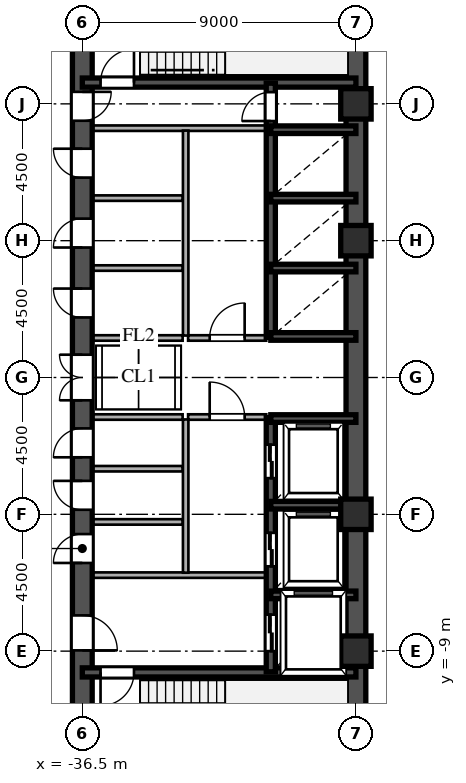
"""IFC4 building model, lengths in metres.
Left out: names, types, materials, properties, quantities, classifications, styles, units other than length and angle.
Written with IfcOpenShell. Run it as: python <this file> out.ifc"""

import sys

from ifc_helpers import new_model, si_unit, direction, frame, frame_2d, origin, origin_2d, place, context, subcontext, project, spatial, rectangle, hollow_rectangle, extrude, source, transform, mapped, element, fill, save


model = new_model("IFC4")
c1 = context("Model", 3, precision=1e-05, world=origin(), true_north=direction((0.0, 1.0)))
c2 = subcontext(c1, "Body", "Model", "MODEL_VIEW")
j1 = project(units=[si_unit("LENGTHUNIT", "METRE"), si_unit("PLANEANGLEUNIT", "RADIAN")], contexts=[c1])
p1 = place(None, origin())
s1 = spatial("IfcSite", under=j1, at=p1, CompositionType="ELEMENT")
p2 = place(p1, origin())
s2 = spatial("IfcBuilding", under=s1, at=p2, CompositionType="ELEMENT")
p3 = place(p2, frame((0.0, 0.0, 80.1)))
s3 = spatial("IfcBuildingStorey", under=s2, at=p3, CompositionType="ELEMENT", Elevation=80.1)
m1 = source(origin(), c2, "Body", "SweptSolid", [
    extrude(hollow_rectangle(XDim=1.0, YDim=1.0, WallThickness=0.042, at=origin_2d()), origin(), (0.0, 0.0, 1.0), 3.6),
])
for number, where, z_axis, x_axis in (
    (1, (-27.5, -9.0, 0.0), (0.0, 0.0, 1.0), (1.0, 0.0, 0.0)),
    (2, (-27.5, -4.5, 0.0), (0.0, 0.0, 1.0), (1.0, 0.0, 0.0)),
    (3, (-27.5, 4.5, 0.0), (0.0, 0.0, 1.0), (1.0, 0.0, 0.0)),
    (4, (-27.5, 9.0, 0.0), (0.0, 0.0, 1.0), (1.0, 0.0, 0.0)),
):
    element("IfcColumn", number, at=place(p3, frame(where, z_axis=z_axis, x_axis=x_axis)), inside=s3, PredefinedType="COLUMN", context=c2, shape_type="MappedRepresentation", body=[
        mapped(m1, transform((0.0, 0.0, 0.0), scale=1.0)),
    ])
for number, where, z_axis, x_axis in (
    (5, (-27.5, -13.5, 0.0), (0.0, 0.0, 1.0), (0.0, 1.0, 0.0)),
    (6, (-27.5, 1.3, 0.0), (0.0, 0.0, 1.0), (0.0, 1.0, 0.0)),
):
    element("IfcWall", number, at=place(p3, frame(where, z_axis=z_axis, x_axis=x_axis)), inside=s3, PredefinedType="SHEAR", context=c2, shape_type="SweptSolid", body=[
        extrude(rectangle(XDim=12.2, YDim=0.65, at=frame_2d((6.1, 0.0))), origin(), (0.0, 0.0, 1.0), 3.38),
    ])
p4 = place(p3, frame((-27.5, -1.3, 0.0), z_axis=(0.0, 0.0, 1.0), x_axis=(0.0, 1.0, 0.0)))
e7 = element("IfcWall", 7, at=p4, inside=s3, PredefinedType="SHEAR", context=c2, shape_type="SweptSolid", body=[
    extrude(rectangle(XDim=2.6, YDim=0.65, at=frame_2d((1.3, 0.0))), origin(), (0.0, 0.0, 1.0), 3.38),
])
p5 = place(p3, frame((-36.5, -13.65, 0.0), z_axis=(0.0, 0.0, 1.0), x_axis=(0.0, 1.0, 0.0)))
e8 = element("IfcWall", 8, at=p5, inside=s3, PredefinedType="SHEAR", context=c2, shape_type="SweptSolid", body=[
    extrude(rectangle(XDim=7.15, YDim=0.65, at=frame_2d((3.575, 0.0))), origin(), (0.0, 0.0, 1.0), 3.38),
])
p6 = place(p5, frame((4.675, 0.0, 0.0)))
e9 = element("IfcOpeningElement", 9, at=p6, cuts=e8, PredefinedType="OPENING", context=c2, shape_type="SweptSolid", body=[
    extrude(rectangle(XDim=1.15, YDim=2.2, at=frame_2d((0.575, 1.1))), frame((0.0, 0.335, 0.0), z_axis=(0.0, -1.0, 0.0), x_axis=(1.0, 0.0, 0.0)), (0.0, 0.0, 1.0), 0.67),
])
p7 = place(p3, frame((-36.5, -1.3, 0.0), z_axis=(0.0, 0.0, 1.0), x_axis=(0.0, 1.0, 0.0)))
e10 = element("IfcWall", 10, at=p7, inside=s3, PredefinedType="SHEAR", context=c2, shape_type="SweptSolid", body=[
    extrude(rectangle(XDim=2.6, YDim=0.65, at=frame_2d((1.3, 0.0))), origin(), (0.0, 0.0, 1.0), 3.38),
])
p8 = place(p7, frame((0.55, 0.0, 0.0)))
e11 = element("IfcOpeningElement", 11, at=p8, cuts=e10, PredefinedType="OPENING", context=c2, shape_type="SweptSolid", body=[
    extrude(rectangle(XDim=1.5, YDim=2.3, at=frame_2d((0.75, 1.15))), frame((0.0, 0.335, 0.0), z_axis=(0.0, -1.0, 0.0), x_axis=(1.0, 0.0, 0.0)), (0.0, 0.0, 1.0), 0.67),
])
p9 = place(p3, frame((-36.5, 8.2, 0.0), z_axis=(0.0, 0.0, 1.0), x_axis=(0.0, 1.0, 0.0)))
e12 = element("IfcWall", 12, at=p9, inside=s3, PredefinedType="SHEAR", context=c2, shape_type="SweptSolid", body=[
    extrude(rectangle(XDim=5.45, YDim=0.65, at=frame_2d((2.725, 0.0))), origin(), (0.0, 0.0, 1.0), 3.38),
])
p10 = place(p9, frame((0.245, 0.0, 0.0)))
e13 = element("IfcOpeningElement", 13, at=p10, cuts=e12, PredefinedType="OPENING", context=c2, shape_type="SweptSolid", body=[
    extrude(rectangle(XDim=0.95, YDim=2.15, at=frame_2d((0.475, 1.075))), frame((0.0, 0.335, 0.0), z_axis=(0.0, -1.0, 0.0), x_axis=(1.0, 0.0, 0.0)), (0.0, 0.0, 1.0), 0.67),
])
p11 = place(p3, frame((-36.5, -6.5, 0.0), z_axis=(0.0, 0.0, 1.0), x_axis=(0.0, 1.0, 0.0)))
e14 = element("IfcWall", 14, at=p11, inside=s3, PredefinedType="SHEAR", context=c2, shape_type="SweptSolid", body=[
    extrude(rectangle(XDim=1.75, YDim=0.65, at=frame_2d((0.875, 0.0))), origin(), (0.0, 0.0, 1.0), 3.38),
])
p12 = place(p11, frame((0.4, 0.0, 0.0)))
e15 = element("IfcOpeningElement", 15, at=p12, cuts=e14, PredefinedType="OPENING", context=c2, shape_type="SweptSolid", body=[
    extrude(rectangle(XDim=0.95, YDim=2.15, at=frame_2d((0.475, 1.075))), frame((0.0, 0.335, 0.0), z_axis=(0.0, -1.0, 0.0), x_axis=(1.0, 0.0, 0.0)), (0.0, 0.0, 1.0), 0.67),
])
p13 = place(p3, frame((-36.5, -4.75, 0.0), z_axis=(0.0, 0.0, 1.0), x_axis=(0.0, 1.0, 0.0)))
e16 = element("IfcWall", 16, at=p13, inside=s3, PredefinedType="SHEAR", context=c2, shape_type="SweptSolid", body=[
    extrude(rectangle(XDim=1.75, YDim=0.65, at=frame_2d((0.875, 0.0))), origin(), (0.0, 0.0, 1.0), 3.38),
])
p14 = place(p13, frame((0.4, 0.0, 0.0)))
e17 = element("IfcOpeningElement", 17, at=p14, cuts=e16, PredefinedType="OPENING", context=c2, shape_type="SweptSolid", body=[
    extrude(rectangle(XDim=0.95, YDim=2.15, at=frame_2d((0.475, 1.075))), frame((0.0, 0.335, 0.0), z_axis=(0.0, -1.0, 0.0), x_axis=(1.0, 0.0, 0.0)), (0.0, 0.0, 1.0), 0.67),
])
p15 = place(p3, frame((-36.5, -3.0, 0.0), z_axis=(0.0, 0.0, 1.0), x_axis=(0.0, 1.0, 0.0)))
e18 = element("IfcWall", 18, at=p15, inside=s3, PredefinedType="SHEAR", context=c2, shape_type="SweptSolid", body=[
    extrude(rectangle(XDim=1.7, YDim=0.65, at=frame_2d((0.85, 0.0))), origin(), (0.0, 0.0, 1.0), 3.38),
])
p16 = place(p15, frame((0.375, 0.0, 0.0)))
e19 = element("IfcOpeningElement", 19, at=p16, cuts=e18, PredefinedType="OPENING", context=c2, shape_type="SweptSolid", body=[
    extrude(rectangle(XDim=0.95, YDim=2.15, at=frame_2d((0.475, 1.075))), frame((0.0, 0.335, 0.0), z_axis=(0.0, -1.0, 0.0), x_axis=(1.0, 0.0, 0.0)), (0.0, 0.0, 1.0), 0.67),
])
p17 = place(p3, frame((-36.5, 1.3, 0.0), z_axis=(0.0, 0.0, 1.0), x_axis=(0.0, 1.0, 0.0)))
e20 = element("IfcWall", 20, at=p17, inside=s3, PredefinedType="SHEAR", context=c2, shape_type="SweptSolid", body=[
    extrude(rectangle(XDim=2.3, YDim=0.65, at=frame_2d((1.15, 0.0))), origin(), (0.0, 0.0, 1.0), 3.38),
])
p18 = place(p17, frame((0.675, 0.0, 0.0)))
e21 = element("IfcOpeningElement", 21, at=p18, cuts=e20, PredefinedType="OPENING", context=c2, shape_type="SweptSolid", body=[
    extrude(rectangle(XDim=0.95, YDim=2.15, at=frame_2d((0.475, 1.075))), frame((0.0, 0.335, 0.0), z_axis=(0.0, -1.0, 0.0), x_axis=(1.0, 0.0, 0.0)), (0.0, 0.0, 1.0), 0.67),
])
p19 = place(p3, frame((-36.5, 3.6, 0.0), z_axis=(0.0, 0.0, 1.0), x_axis=(0.0, 1.0, 0.0)))
e22 = element("IfcWall", 22, at=p19, inside=s3, PredefinedType="SHEAR", context=c2, shape_type="SweptSolid", body=[
    extrude(rectangle(XDim=2.3, YDim=0.65, at=frame_2d((1.15, 0.0))), origin(), (0.0, 0.0, 1.0), 3.38),
])
p20 = place(p19, frame((0.675, 0.0, 0.0)))
e23 = element("IfcOpeningElement", 23, at=p20, cuts=e22, PredefinedType="OPENING", context=c2, shape_type="SweptSolid", body=[
    extrude(rectangle(XDim=0.95, YDim=2.15, at=frame_2d((0.475, 1.075))), frame((0.0, 0.335, 0.0), z_axis=(0.0, -1.0, 0.0), x_axis=(1.0, 0.0, 0.0)), (0.0, 0.0, 1.0), 0.67),
])
p21 = place(p3, frame((-36.5, 5.9, 0.0), z_axis=(0.0, 0.0, 1.0), x_axis=(0.0, 1.0, 0.0)))
e24 = element("IfcWall", 24, at=p21, inside=s3, PredefinedType="SHEAR", context=c2, shape_type="SweptSolid", body=[
    extrude(rectangle(XDim=2.3, YDim=0.65, at=frame_2d((1.15, 0.0))), origin(), (0.0, 0.0, 1.0), 3.38),
])
p22 = place(p21, frame((0.675, 0.0, 0.0)))
e25 = element("IfcOpeningElement", 25, at=p22, cuts=e24, PredefinedType="OPENING", context=c2, shape_type="SweptSolid", body=[
    extrude(rectangle(XDim=0.95, YDim=2.15, at=frame_2d((0.475, 1.075))), frame((0.0, 0.335, 0.0), z_axis=(0.0, -1.0, 0.0), x_axis=(1.0, 0.0, 0.0)), (0.0, 0.0, 1.0), 0.67),
])
p23 = place(p3, frame((-36.5, -9.7, 0.0), z_axis=(0.0, 0.0, 1.0), x_axis=(1.0, 0.0, 0.0)))
e26 = element("IfcWall", 26, at=p23, inside=s3, PredefinedType="SHEAR", context=c2, shape_type="SweptSolid", body=[
    extrude(rectangle(XDim=9.0, YDim=0.3, at=frame_2d((4.5, 0.0))), origin(), (0.0, 0.0, 1.0), 3.38),
])
p24 = place(p23, frame((0.6, 0.0, 0.0)))
e27 = element("IfcOpeningElement", 27, at=p24, cuts=e26, PredefinedType="OPENING", context=c2, shape_type="SweptSolid", body=[
    extrude(rectangle(XDim=1.1, YDim=2.2, at=frame_2d((0.55, 1.1))), frame((0.0, 0.16, 0.0), z_axis=(0.0, -1.0, 0.0), x_axis=(1.0, 0.0, 0.0)), (0.0, 0.0, 1.0), 0.32),
])
p25 = place(p3, frame((-36.5, 9.7, 0.0), z_axis=(0.0, 0.0, 1.0), x_axis=(1.0, 0.0, 0.0)))
e28 = element("IfcWall", 28, at=p25, inside=s3, PredefinedType="SHEAR", context=c2, shape_type="SweptSolid", body=[
    extrude(rectangle(XDim=9.0, YDim=0.3, at=frame_2d((4.5, 0.0))), origin(), (0.0, 0.0, 1.0), 3.38),
])
p26 = place(p25, frame((0.6, 0.0, 0.0)))
e29 = element("IfcOpeningElement", 29, at=p26, cuts=e28, PredefinedType="OPENING", context=c2, shape_type="SweptSolid", body=[
    extrude(rectangle(XDim=1.1, YDim=2.2, at=frame_2d((0.55, 1.1))), frame((0.0, 0.16, 0.0), z_axis=(0.0, -1.0, 0.0), x_axis=(1.0, 0.0, 0.0)), (0.0, 0.0, 1.0), 0.32),
])
for number, where, z_axis, x_axis in (
    (30, (-30.3, -7.15, 0.0), (0.0, 0.0, 1.0), (1.0, 0.0, 0.0)),
    (31, (-30.3, -4.2, 0.0), (0.0, 0.0, 1.0), (1.0, 0.0, 0.0)),
    (32, (-30.3, -1.35, 0.0), (0.0, 0.0, 1.0), (1.0, 0.0, 0.0)),
    (33, (-30.3, 1.35, 0.0), (0.0, 0.0, 1.0), (1.0, 0.0, 0.0)),
    (34, (-30.3, 3.6, 0.0), (0.0, 0.0, 1.0), (1.0, 0.0, 0.0)),
    (35, (-30.3, 5.9, 0.0), (0.0, 0.0, 1.0), (1.0, 0.0, 0.0)),
    (36, (-30.3, 8.15, 0.0), (0.0, 0.0, 1.0), (1.0, 0.0, 0.0)),
):
    element("IfcWall", number, at=place(p3, frame(where, z_axis=z_axis, x_axis=x_axis)), inside=s3, PredefinedType="SHEAR", context=c2, shape_type="SweptSolid", body=[
        extrude(rectangle(XDim=2.8, YDim=0.25, at=frame_2d((1.4, 0.0))), origin(), (0.0, 0.0, 1.0), 3.38),
    ])
p27 = place(p3, frame((-30.3, -9.68, 0.0), z_axis=(0.0, 0.0, 1.0), x_axis=(0.0, 1.0, 0.0)))
e37 = element("IfcWall", 37, at=p27, inside=s3, PredefinedType="SHEAR", context=c2, shape_type="SweptSolid", body=[
    extrude(rectangle(XDim=2.56, YDim=0.3, at=frame_2d((1.28, 0.0))), origin(), (0.0, 0.0, 1.0), 3.38),
])
p28 = place(p27, frame((0.68, 0.0, 0.0)))
e38 = element("IfcOpeningElement", 38, at=p28, cuts=e37, PredefinedType="OPENING", context=c2, shape_type="SweptSolid", body=[
    extrude(rectangle(XDim=1.2, YDim=2.25, at=frame_2d((0.6, 1.125))), frame((0.0, 0.16, 0.0), z_axis=(0.0, -1.0, 0.0), x_axis=(1.0, 0.0, 0.0)), (0.0, 0.0, 1.0), 0.32),
])
p29 = place(p3, frame((-30.3, -7.12, 0.0), z_axis=(0.0, 0.0, 1.0), x_axis=(0.0, 1.0, 0.0)))
e39 = element("IfcWall", 39, at=p29, inside=s3, PredefinedType="SHEAR", context=c2, shape_type="SweptSolid", body=[
    extrude(rectangle(XDim=2.92, YDim=0.3, at=frame_2d((1.46, 0.0))), origin(), (0.0, 0.0, 1.0), 3.38),
])
p30 = place(p29, frame((0.91, 0.0, 0.0)))
e40 = element("IfcOpeningElement", 40, at=p30, cuts=e39, PredefinedType="OPENING", context=c2, shape_type="SweptSolid", body=[
    extrude(rectangle(XDim=1.1, YDim=2.2, at=frame_2d((0.55, 1.1))), frame((0.0, 0.16, 0.0), z_axis=(0.0, -1.0, 0.0), x_axis=(1.0, 0.0, 0.0)), (0.0, 0.0, 1.0), 0.32),
])
p31 = place(p3, frame((-30.3, -4.2, 0.0), z_axis=(0.0, 0.0, 1.0), x_axis=(0.0, 1.0, 0.0)))
e41 = element("IfcWall", 41, at=p31, inside=s3, PredefinedType="SHEAR", context=c2, shape_type="SweptSolid", body=[
    extrude(rectangle(XDim=2.88, YDim=0.3, at=frame_2d((1.44, 0.0))), origin(), (0.0, 0.0, 1.0), 3.38),
])
p32 = place(p31, frame((0.89, 0.0, 0.0)))
e42 = element("IfcOpeningElement", 42, at=p32, cuts=e41, PredefinedType="OPENING", context=c2, shape_type="SweptSolid", body=[
    extrude(rectangle(XDim=1.1, YDim=2.2, at=frame_2d((0.55, 1.1))), frame((0.0, 0.16, 0.0), z_axis=(0.0, -1.0, 0.0), x_axis=(1.0, 0.0, 0.0)), (0.0, 0.0, 1.0), 0.32),
])
p33 = place(p3, frame((-30.3, 1.32, 0.0), z_axis=(0.0, 0.0, 1.0), x_axis=(0.0, 1.0, 0.0)))
e43 = element("IfcWall", 43, at=p33, inside=s3, PredefinedType="SHEAR", context=c2, shape_type="SweptSolid", body=[
    extrude(rectangle(XDim=2.28, YDim=0.3, at=frame_2d((1.14, 0.0))), origin(), (0.0, 0.0, 1.0), 3.38),
])
p34 = place(p3, frame((-30.3, 3.6, 0.0), z_axis=(0.0, 0.0, 1.0), x_axis=(0.0, 1.0, 0.0)))
e44 = element("IfcWall", 44, at=p34, inside=s3, PredefinedType="SHEAR", context=c2, shape_type="SweptSolid", body=[
    extrude(rectangle(XDim=2.3, YDim=0.3, at=frame_2d((1.15, 0.0))), origin(), (0.0, 0.0, 1.0), 3.38),
])
p35 = place(p3, frame((-30.3, 5.9, 0.0), z_axis=(0.0, 0.0, 1.0), x_axis=(0.0, 1.0, 0.0)))
e45 = element("IfcWall", 45, at=p35, inside=s3, PredefinedType="SHEAR", context=c2, shape_type="SweptSolid", body=[
    extrude(rectangle(XDim=2.25, YDim=0.3, at=frame_2d((1.125, 0.0))), origin(), (0.0, 0.0, 1.0), 3.38),
])
p36 = place(p3, frame((-30.3, 8.15, 0.0), z_axis=(0.0, 0.0, 1.0), x_axis=(0.0, 1.0, 0.0)))
e46 = element("IfcWall", 46, at=p36, inside=s3, PredefinedType="SHEAR", context=c2, shape_type="SweptSolid", body=[
    extrude(rectangle(XDim=1.53, YDim=0.3, at=frame_2d((0.765, 0.0))), origin(), (0.0, 0.0, 1.0), 3.38),
])
p37 = place(p36, frame((0.285, 0.0, 0.0)))
e47 = element("IfcOpeningElement", 47, at=p37, cuts=e46, PredefinedType="OPENING", context=c2, shape_type="SweptSolid", body=[
    extrude(rectangle(XDim=0.95, YDim=2.15, at=frame_2d((0.475, 1.075))), frame((0.0, 0.16, 0.0), z_axis=(0.0, -1.0, 0.0), x_axis=(1.0, 0.0, 0.0)), (0.0, 0.0, 1.0), 0.32),
])
for number, where, z_axis, x_axis in (
    (48, (-36.15, -6.5, 0.0), (0.0, 0.0, 1.0), (1.0, 0.0, 0.0)),
    (49, (-36.15, 8.2, 0.0), (0.0, 0.0, 1.0), (1.0, 0.0, 0.0)),
):
    element("IfcWall", number, at=place(p3, frame(where, z_axis=z_axis, x_axis=x_axis)), inside=s3, PredefinedType="PARTITIONING", context=c2, shape_type="SweptSolid", body=[
        extrude(rectangle(XDim=5.7, YDim=0.18, at=frame_2d((2.85, 0.0))), origin(), (0.0, 0.0, 1.0), 3.38),
    ])
p38 = place(p3, frame((-33.1, -6.42, 0.0), z_axis=(0.0, 0.0, 1.0), x_axis=(0.0, 1.0, 0.0)))
e50 = element("IfcWall", 50, at=p38, inside=s3, PredefinedType="PARTITIONING", context=c2, shape_type="SweptSolid", body=[
    extrude(rectangle(XDim=5.04, YDim=0.18, at=frame_2d((2.52, 0.0))), origin(), (0.0, 0.0, 1.0), 3.38),
])
p39 = place(p3, frame((-33.1, 1.38, 0.0), z_axis=(0.0, 0.0, 1.0), x_axis=(0.0, 1.0, 0.0)))
e51 = element("IfcWall", 51, at=p39, inside=s3, PredefinedType="PARTITIONING", context=c2, shape_type="SweptSolid", body=[
    extrude(rectangle(XDim=6.74, YDim=0.18, at=frame_2d((3.37, 0.0))), origin(), (0.0, 0.0, 1.0), 3.38),
])
p40 = place(p3, frame((-33.02, -1.3, 0.0), z_axis=(0.0, 0.0, 1.0), x_axis=(1.0, 0.0, 0.0)))
e52 = element("IfcWall", 52, at=p40, inside=s3, PredefinedType="PARTITIONING", context=c2, shape_type="SweptSolid", body=[
    extrude(rectangle(XDim=2.57, YDim=0.18, at=frame_2d((1.285, 0.0))), origin(), (0.0, 0.0, 1.0), 3.38),
])
p41 = place(p40, frame((0.71, 0.0, 0.0)))
e53 = element("IfcOpeningElement", 53, at=p41, cuts=e52, PredefinedType="OPENING", context=c2, shape_type="SweptSolid", body=[
    extrude(rectangle(XDim=1.15, YDim=2.2, at=frame_2d((0.575, 1.1))), frame((0.0, 0.1, 0.0), z_axis=(0.0, -1.0, 0.0), x_axis=(1.0, 0.0, 0.0)), (0.0, 0.0, 1.0), 0.2),
])
p42 = place(p3, frame((-33.02, 1.3, 0.0), z_axis=(0.0, 0.0, 1.0), x_axis=(1.0, 0.0, 0.0)))
e54 = element("IfcWall", 54, at=p42, inside=s3, PredefinedType="PARTITIONING", context=c2, shape_type="SweptSolid", body=[
    extrude(rectangle(XDim=2.57, YDim=0.18, at=frame_2d((1.285, 0.0))), origin(), (0.0, 0.0, 1.0), 3.38),
])
p43 = place(p42, frame((0.71, 0.0, 0.0)))
e55 = element("IfcOpeningElement", 55, at=p43, cuts=e54, PredefinedType="OPENING", context=c2, shape_type="SweptSolid", body=[
    extrude(rectangle(XDim=1.15, YDim=2.2, at=frame_2d((0.575, 1.1))), frame((0.0, 0.1, 0.0), z_axis=(0.0, -1.0, 0.0), x_axis=(1.0, 0.0, 0.0)), (0.0, 0.0, 1.0), 0.2),
])
for number, where, z_axis, x_axis in (
    (56, (-36.15, -1.3, 0.0), (0.0, 0.0, 1.0), (1.0, 0.0, 0.0)),
    (57, (-36.15, 1.3, 0.0), (0.0, 0.0, 1.0), (1.0, 0.0, 0.0)),
    (58, (-36.15, -4.75, 0.0), (0.0, 0.0, 1.0), (1.0, 0.0, 0.0)),
    (59, (-36.15, -3.0, 0.0), (0.0, 0.0, 1.0), (1.0, 0.0, 0.0)),
    (60, (-36.15, 3.6, 0.0), (0.0, 0.0, 1.0), (1.0, 0.0, 0.0)),
    (61, (-36.15, 5.9, 0.0), (0.0, 0.0, 1.0), (1.0, 0.0, 0.0)),
):
    element("IfcWall", number, at=place(p3, frame(where, z_axis=z_axis, x_axis=x_axis)), inside=s3, PredefinedType="PARTITIONING", context=c2, shape_type="SweptSolid", body=[
        extrude(rectangle(XDim=2.95, YDim=0.18, at=frame_2d((1.475, 0.0))), origin(), (0.0, 0.0, 1.0), 3.38),
    ])
m2 = source(origin(), c2, "Body", "SweptSolid", [
    extrude(rectangle(XDim=1.15, YDim=2.2, at=frame_2d((0.575, 1.1))), frame((0.0, 0.025, 0.0), z_axis=(0.0, -1.0, 0.0), x_axis=(1.0, 0.0, 0.0)), (0.0, 0.0, 1.0), 0.05),
])
p44 = place(p6, frame((1.15, 0.0, 0.0), z_axis=(0.0, 0.0, 1.0), x_axis=(-1.0, 0.0, 0.0)))
e62 = element("IfcDoor", 62, at=p44, inside=s3, OperationType="SINGLE_SWING_LEFT", PredefinedType="DOOR", context=c2, shape_type="MappedRepresentation", body=[
    mapped(m2, transform((0.0, 0.0, 0.0), scale=1.0)),
])
fill(e9, e62)
m3 = source(origin(), c2, "Body", "SweptSolid", [
    extrude(rectangle(XDim=1.5, YDim=2.3, at=frame_2d((0.75, 1.15))), frame((0.0, 0.025, 0.0), z_axis=(0.0, -1.0, 0.0), x_axis=(1.0, 0.0, 0.0)), (0.0, 0.0, 1.0), 0.05),
])
p45 = place(p8, origin())
e63 = element("IfcDoor", 63, at=p45, inside=s3, OperationType="DOUBLE_SWING_LEFT", PredefinedType="DOOR", context=c2, shape_type="MappedRepresentation", body=[
    mapped(m3, transform((0.0, 0.0, 0.0), scale=1.0)),
])
fill(e11, e63)
m4 = source(origin(), c2, "Body", "SweptSolid", [
    extrude(rectangle(XDim=0.95, YDim=2.15, at=frame_2d((0.475, 1.075))), frame((0.0, 0.025, 0.0), z_axis=(0.0, -1.0, 0.0), x_axis=(1.0, 0.0, 0.0)), (0.0, 0.0, 1.0), 0.05),
])
p46 = place(p10, frame((0.95, 0.0, 0.0), z_axis=(0.0, 0.0, 1.0), x_axis=(-1.0, 0.0, 0.0)))
e64 = element("IfcDoor", 64, at=p46, inside=s3, OperationType="SINGLE_SWING_RIGHT", PredefinedType="DOOR", context=c2, shape_type="MappedRepresentation", body=[
    mapped(m4, transform((0.0, 0.0, 0.0), scale=1.0)),
])
fill(e13, e64)
p47 = place(p12, origin())
e65 = element("IfcDoor", 65, at=p47, inside=s3, OperationType="SINGLE_SWING_LEFT", PredefinedType="DOOR", context=c2, shape_type="MappedRepresentation", body=[
    mapped(m4, transform((0.0, 0.0, 0.0), scale=1.0)),
])
fill(e15, e65)
p48 = place(p14, origin())
e66 = element("IfcDoor", 66, at=p48, inside=s3, OperationType="SINGLE_SWING_RIGHT", PredefinedType="DOOR", context=c2, shape_type="MappedRepresentation", body=[
    mapped(m4, transform((0.0, 0.0, 0.0), scale=1.0)),
])
fill(e17, e66)
p49 = place(p16, origin())
e67 = element("IfcDoor", 67, at=p49, inside=s3, OperationType="SINGLE_SWING_LEFT", PredefinedType="DOOR", context=c2, shape_type="MappedRepresentation", body=[
    mapped(m4, transform((0.0, 0.0, 0.0), scale=1.0)),
])
fill(e19, e67)
p50 = place(p18, origin())
e68 = element("IfcDoor", 68, at=p50, inside=s3, OperationType="SINGLE_SWING_RIGHT", PredefinedType="DOOR", context=c2, shape_type="MappedRepresentation", body=[
    mapped(m4, transform((0.0, 0.0, 0.0), scale=1.0)),
])
fill(e21, e68)
p51 = place(p20, origin())
e69 = element("IfcDoor", 69, at=p51, inside=s3, OperationType="SINGLE_SWING_LEFT", PredefinedType="DOOR", context=c2, shape_type="MappedRepresentation", body=[
    mapped(m4, transform((0.0, 0.0, 0.0), scale=1.0)),
])
fill(e23, e69)
p52 = place(p22, origin())
e70 = element("IfcDoor", 70, at=p52, inside=s3, OperationType="SINGLE_SWING_RIGHT", PredefinedType="DOOR", context=c2, shape_type="MappedRepresentation", body=[
    mapped(m4, transform((0.0, 0.0, 0.0), scale=1.0)),
])
fill(e25, e70)
m5 = source(origin(), c2, "Body", "SweptSolid", [
    extrude(rectangle(XDim=1.1, YDim=2.2, at=frame_2d((0.55, 1.1))), frame((0.0, 0.025, 0.0), z_axis=(0.0, -1.0, 0.0), x_axis=(1.0, 0.0, 0.0)), (0.0, 0.0, 1.0), 0.05),
])
p53 = place(p24, frame((1.1, 0.0, 0.0), z_axis=(0.0, 0.0, 1.0), x_axis=(-1.0, 0.0, 0.0)))
e71 = element("IfcDoor", 71, at=p53, inside=s3, OperationType="SINGLE_SWING_LEFT", PredefinedType="DOOR", context=c2, shape_type="MappedRepresentation", body=[
    mapped(m5, transform((0.0, 0.0, 0.0), scale=1.0)),
])
fill(e27, e71)
p54 = place(p26, origin())
e72 = element("IfcDoor", 72, at=p54, inside=s3, OperationType="SINGLE_SWING_RIGHT", PredefinedType="DOOR", context=c2, shape_type="MappedRepresentation", body=[
    mapped(m5, transform((0.0, 0.0, 0.0), scale=1.0)),
])
fill(e29, e72)
m6 = source(origin(), c2, "Body", "SweptSolid", [
    extrude(rectangle(XDim=1.2, YDim=2.25, at=frame_2d((0.6, 1.125))), frame((0.0, 0.025, 0.0), z_axis=(0.0, -1.0, 0.0), x_axis=(1.0, 0.0, 0.0)), (0.0, 0.0, 1.0), 0.05),
])
p55 = place(p28, origin())
e73 = element("IfcDoor", 73, at=p55, inside=s3, OperationType="DOUBLE_DOOR_SLIDING", PredefinedType="DOOR", context=c2, shape_type="MappedRepresentation", body=[
    mapped(m6, transform((0.0, 0.0, 0.0), scale=1.0)),
])
fill(e38, e73)
m7 = source(origin(), c2, "Body", "SweptSolid", [
    extrude(rectangle(XDim=1.1, YDim=2.2, at=frame_2d((0.55, 1.1))), frame((0.0, 0.025, 0.0), z_axis=(0.0, -1.0, 0.0), x_axis=(1.0, 0.0, 0.0)), (0.0, 0.0, 1.0), 0.05),
])
p56 = place(p30, origin())
e74 = element("IfcDoor", 74, at=p56, inside=s3, OperationType="DOUBLE_DOOR_SLIDING", PredefinedType="DOOR", context=c2, shape_type="MappedRepresentation", body=[
    mapped(m7, transform((0.0, 0.0, 0.0), scale=1.0)),
])
fill(e40, e74)
p57 = place(p32, origin())
e75 = element("IfcDoor", 75, at=p57, inside=s3, OperationType="DOUBLE_DOOR_SLIDING", PredefinedType="DOOR", context=c2, shape_type="MappedRepresentation", body=[
    mapped(m7, transform((0.0, 0.0, 0.0), scale=1.0)),
])
fill(e42, e75)
p58 = place(p37, origin())
e76 = element("IfcDoor", 76, at=p58, inside=s3, OperationType="SINGLE_SWING_LEFT", PredefinedType="DOOR", context=c2, shape_type="MappedRepresentation", body=[
    mapped(m4, transform((0.0, 0.0, 0.0), scale=1.0)),
])
fill(e47, e76)
p59 = place(p41, origin())
e77 = element("IfcDoor", 77, at=p59, inside=s3, OperationType="SINGLE_SWING_LEFT", PredefinedType="DOOR", context=c2, shape_type="MappedRepresentation", body=[
    mapped(m2, transform((0.0, 0.0, 0.0), scale=1.0)),
])
fill(e53, e77)
p60 = place(p43, origin())
e78 = element("IfcDoor", 78, at=p60, inside=s3, OperationType="SINGLE_SWING_RIGHT", PredefinedType="DOOR", context=c2, shape_type="MappedRepresentation", body=[
    mapped(m2, transform((0.0, 0.0, 0.0), scale=1.0)),
])
fill(e55, e78)
save(model, sys.argv[1])
